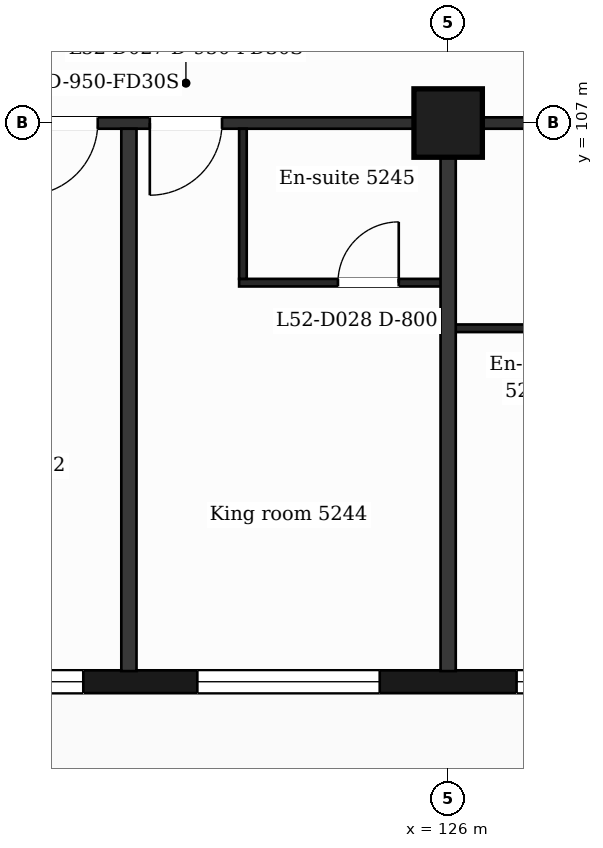
"""IFC4 building model, lengths in metres.
Left out: names, types, materials, properties, quantities, classifications, styles, units other than length and angle.
Written with IfcOpenShell. Run it as: python <this file> out.ifc"""

import sys

from ifc_helpers import new_model, si_unit, direction, frame, frame_2d, origin, origin_2d, place, context, subcontext, project, spatial, rectangle, extrude, element, fill, save


model = new_model("IFC4")
c1 = context("Model", 3, precision=1e-05, world=origin(), true_north=direction((0.0, 1.0)))
c2 = subcontext(c1, "Body", "Model", "MODEL_VIEW")
j1 = project(units=[si_unit("LENGTHUNIT", "METRE"), si_unit("PLANEANGLEUNIT", "RADIAN")], contexts=[c1])
p1 = place(None, origin())
s1 = spatial("IfcSite", under=j1, at=p1, CompositionType="ELEMENT")
p2 = place(p1, origin())
s2 = spatial("IfcBuilding", under=s1, at=p2, CompositionType="ELEMENT")
p3 = place(p2, frame((0.0, 0.0, 217.0)))
s3 = spatial("IfcBuildingStorey", under=s2, at=p3, CompositionType="ELEMENT", Elevation=217.0)
p4 = place(p3, frame((126.0, 107.0, 0.0), z_axis=(0.0, 0.0, 1.0), x_axis=(1.0, 0.0, 0.0)))
e1 = element("IfcColumn", 1, at=p4, inside=s3, PredefinedType="COLUMN", context=c2, shape_type="SweptSolid", body=[
    extrude(rectangle(XDim=0.9, YDim=0.9, at=origin_2d()), origin(), (0.0, 0.0, 1.0), 3.7),
])
p5 = place(p3, frame((89.85, 99.65, 0.0), z_axis=(0.0, 0.0, 1.0), x_axis=(1.0, 0.0, 0.0)))
e2 = element("IfcWall", 2, at=p5, inside=s3, PredefinedType="SOLIDWALL", context=c2, shape_type="SweptSolid", body=[
    extrude(rectangle(XDim=47.25, YDim=0.3, at=frame_2d((23.625, 0.0))), origin(), (0.0, 0.0, 1.0), 3.38),
])
p6 = place(p5, frame((0.725, 0.0, 0.9)))
e3 = element("IfcOpeningElement", 3, at=p6, cuts=e2, PredefinedType="OPENING", context=c2, shape_type="SweptSolid", body=[
    extrude(rectangle(XDim=1.2, YDim=2.1, at=frame_2d((0.6, 1.05))), frame((0.0, 0.16, 0.0), z_axis=(0.0, -1.0, 0.0), x_axis=(1.0, 0.0, 0.0)), (0.0, 0.0, 1.0), 0.32),
])
p7 = place(p5, frame((3.45, 0.0, 0.9)))
e4 = element("IfcOpeningElement", 4, at=p7, cuts=e2, PredefinedType="OPENING", context=c2, shape_type="SweptSolid", body=[
    extrude(rectangle(XDim=2.4, YDim=2.1, at=frame_2d((1.2, 1.05))), frame((0.0, 0.16, 0.0), z_axis=(0.0, -1.0, 0.0), x_axis=(1.0, 0.0, 0.0)), (0.0, 0.0, 1.0), 0.32),
])
p8 = place(p5, frame((7.65, 0.0, 0.9)))
e5 = element("IfcOpeningElement", 5, at=p8, cuts=e2, PredefinedType="OPENING", context=c2, shape_type="SweptSolid", body=[
    extrude(rectangle(XDim=2.4, YDim=2.1, at=frame_2d((1.2, 1.05))), frame((0.0, 0.16, 0.0), z_axis=(0.0, -1.0, 0.0), x_axis=(1.0, 0.0, 0.0)), (0.0, 0.0, 1.0), 0.32),
])
p9 = place(p5, frame((12.45, 0.0, 0.9)))
e6 = element("IfcOpeningElement", 6, at=p9, cuts=e2, PredefinedType="OPENING", context=c2, shape_type="SweptSolid", body=[
    extrude(rectangle(XDim=1.2, YDim=2.1, at=frame_2d((0.6, 1.05))), frame((0.0, 0.16, 0.0), z_axis=(0.0, -1.0, 0.0), x_axis=(1.0, 0.0, 0.0)), (0.0, 0.0, 1.0), 0.32),
])
p10 = place(p5, frame((16.65, 0.0, 0.9)))
e7 = element("IfcOpeningElement", 7, at=p10, cuts=e2, PredefinedType="OPENING", context=c2, shape_type="SweptSolid", body=[
    extrude(rectangle(XDim=1.2, YDim=2.1, at=frame_2d((0.6, 1.05))), frame((0.0, 0.16, 0.0), z_axis=(0.0, -1.0, 0.0), x_axis=(1.0, 0.0, 0.0)), (0.0, 0.0, 1.0), 0.32),
])
p11 = place(p5, frame((19.95, 0.0, 0.0)))
e8 = element("IfcOpeningElement", 8, at=p11, cuts=e2, PredefinedType="OPENING", context=c2, shape_type="SweptSolid", body=[
    extrude(rectangle(XDim=1.2, YDim=2.4, at=frame_2d((0.6, 1.2))), frame((0.0, 0.16, 0.0), z_axis=(0.0, -1.0, 0.0), x_axis=(1.0, 0.0, 0.0)), (0.0, 0.0, 1.0), 0.32),
])
p12 = place(p5, frame((21.75, 0.0, 0.9)))
e9 = element("IfcOpeningElement", 9, at=p12, cuts=e2, PredefinedType="OPENING", context=c2, shape_type="SweptSolid", body=[
    extrude(rectangle(XDim=1.2, YDim=2.1, at=frame_2d((0.6, 1.05))), frame((0.0, 0.16, 0.0), z_axis=(0.0, -1.0, 0.0), x_axis=(1.0, 0.0, 0.0)), (0.0, 0.0, 1.0), 0.32),
])
p13 = place(p5, frame((24.45, 0.0, 0.9)))
e10 = element("IfcOpeningElement", 10, at=p13, cuts=e2, PredefinedType="OPENING", context=c2, shape_type="SweptSolid", body=[
    extrude(rectangle(XDim=2.4, YDim=2.1, at=frame_2d((1.2, 1.05))), frame((0.0, 0.16, 0.0), z_axis=(0.0, -1.0, 0.0), x_axis=(1.0, 0.0, 0.0)), (0.0, 0.0, 1.0), 0.32),
])
p14 = place(p5, frame((28.35, 0.0, 0.0)))
e11 = element("IfcOpeningElement", 11, at=p14, cuts=e2, PredefinedType="OPENING", context=c2, shape_type="SweptSolid", body=[
    extrude(rectangle(XDim=1.2, YDim=2.4, at=frame_2d((0.6, 1.2))), frame((0.0, 0.16, 0.0), z_axis=(0.0, -1.0, 0.0), x_axis=(1.0, 0.0, 0.0)), (0.0, 0.0, 1.0), 0.32),
])
p15 = place(p5, frame((30.15, 0.0, 0.9)))
e12 = element("IfcOpeningElement", 12, at=p15, cuts=e2, PredefinedType="OPENING", context=c2, shape_type="SweptSolid", body=[
    extrude(rectangle(XDim=1.2, YDim=2.1, at=frame_2d((0.6, 1.05))), frame((0.0, 0.16, 0.0), z_axis=(0.0, -1.0, 0.0), x_axis=(1.0, 0.0, 0.0)), (0.0, 0.0, 1.0), 0.32),
])
p16 = place(p5, frame((32.85, 0.0, 0.9)))
e13 = element("IfcOpeningElement", 13, at=p16, cuts=e2, PredefinedType="OPENING", context=c2, shape_type="SweptSolid", body=[
    extrude(rectangle(XDim=2.4, YDim=2.1, at=frame_2d((1.2, 1.05))), frame((0.0, 0.16, 0.0), z_axis=(0.0, -1.0, 0.0), x_axis=(1.0, 0.0, 0.0)), (0.0, 0.0, 1.0), 0.32),
])
p17 = place(p5, frame((37.05, 0.0, 0.9)))
e14 = element("IfcOpeningElement", 14, at=p17, cuts=e2, PredefinedType="OPENING", context=c2, shape_type="SweptSolid", body=[
    extrude(rectangle(XDim=2.4, YDim=2.1, at=frame_2d((1.2, 1.05))), frame((0.0, 0.16, 0.0), z_axis=(0.0, -1.0, 0.0), x_axis=(1.0, 0.0, 0.0)), (0.0, 0.0, 1.0), 0.32),
])
p18 = place(p5, frame((41.85, 0.0, 0.9)))
e15 = element("IfcOpeningElement", 15, at=p18, cuts=e2, PredefinedType="OPENING", context=c2, shape_type="SweptSolid", body=[
    extrude(rectangle(XDim=1.2, YDim=2.1, at=frame_2d((0.6, 1.05))), frame((0.0, 0.16, 0.0), z_axis=(0.0, -1.0, 0.0), x_axis=(1.0, 0.0, 0.0)), (0.0, 0.0, 1.0), 0.32),
])
p19 = place(p5, frame((45.25, 0.0, 0.9)))
e16 = element("IfcOpeningElement", 16, at=p19, cuts=e2, PredefinedType="OPENING", context=c2, shape_type="SweptSolid", body=[
    extrude(rectangle(XDim=1.2, YDim=2.1, at=frame_2d((0.6, 1.05))), frame((0.0, 0.16, 0.0), z_axis=(0.0, -1.0, 0.0), x_axis=(1.0, 0.0, 0.0)), (0.0, 0.0, 1.0), 0.32),
])
p20 = place(p3, frame((126.0, 104.3, 0.0), z_axis=(0.0, 0.0, 1.0), x_axis=(1.0, 0.0, 0.0)))
e17 = element("IfcWall", 17, at=p20, inside=s3, PredefinedType="PARTITIONING", context=c2, shape_type="SweptSolid", body=[
    extrude(rectangle(XDim=2.15, YDim=0.1, at=frame_2d((1.075, 0.0))), origin(), (0.0, 0.0, 1.0), 3.38),
])
p21 = place(p3, frame((123.25, 104.9, 0.0), z_axis=(0.0, 0.0, 1.0), x_axis=(1.0, 0.0, 0.0)))
e18 = element("IfcWall", 18, at=p21, inside=s3, PredefinedType="PARTITIONING", context=c2, shape_type="SweptSolid", body=[
    extrude(rectangle(XDim=2.75, YDim=0.1, at=frame_2d((1.375, 0.0))), origin(), (0.0, 0.0, 1.0), 3.38),
])
p22 = place(p21, frame((1.3, 0.0, 0.0)))
e19 = element("IfcOpeningElement", 19, at=p22, cuts=e18, PredefinedType="OPENING", context=c2, shape_type="SweptSolid", body=[
    extrude(rectangle(XDim=0.8, YDim=2.1, at=frame_2d((0.4, 1.05))), frame((0.0, 0.06, 0.0), z_axis=(0.0, -1.0, 0.0), x_axis=(1.0, 0.0, 0.0)), (0.0, 0.0, 1.0), 0.12),
])
p23 = place(p3, frame((87.018, 107.0, 0.0), z_axis=(0.0, 0.0, 1.0), x_axis=(1.0, 0.0, 0.0)))
e20 = element("IfcWall", 20, at=p23, inside=s3, PredefinedType="PARTITIONING", context=c2, shape_type="SweptSolid", body=[
    extrude(rectangle(XDim=52.765, YDim=0.15, at=frame_2d((26.382, 0.0))), origin(), (0.0, 0.0, 1.0), 3.38),
])
p24 = place(p23, frame((1.276, 0.0, 0.0)))
e21 = element("IfcOpeningElement", 21, at=p24, cuts=e20, PredefinedType="OPENING", context=c2, shape_type="SweptSolid", body=[
    extrude(rectangle(XDim=0.95, YDim=2.1, at=frame_2d((0.475, 1.05))), frame((0.0, 0.085, 0.0), z_axis=(0.0, -1.0, 0.0), x_axis=(1.0, 0.0, 0.0)), (0.0, 0.0, 1.0), 0.17),
])
p25 = place(p23, frame((6.034, 0.0, 0.0)))
e22 = element("IfcOpeningElement", 22, at=p25, cuts=e20, PredefinedType="OPENING", context=c2, shape_type="SweptSolid", body=[
    extrude(rectangle(XDim=0.95, YDim=2.1, at=frame_2d((0.475, 1.05))), frame((0.0, 0.085, 0.0), z_axis=(0.0, -1.0, 0.0), x_axis=(1.0, 0.0, 0.0)), (0.0, 0.0, 1.0), 0.17),
])
p26 = place(p23, frame((15.445, 0.0, 0.0)))
e23 = element("IfcOpeningElement", 23, at=p26, cuts=e20, PredefinedType="OPENING", context=c2, shape_type="SweptSolid", body=[
    extrude(rectangle(XDim=0.95, YDim=2.1, at=frame_2d((0.475, 1.05))), frame((0.0, 0.085, 0.0), z_axis=(0.0, -1.0, 0.0), x_axis=(1.0, 0.0, 0.0)), (0.0, 0.0, 1.0), 0.17),
])
p27 = place(p23, frame((18.369, 0.0, 0.0)))
e24 = element("IfcOpeningElement", 24, at=p27, cuts=e20, PredefinedType="OPENING", context=c2, shape_type="SweptSolid", body=[
    extrude(rectangle(XDim=0.95, YDim=2.1, at=frame_2d((0.475, 1.05))), frame((0.0, 0.085, 0.0), z_axis=(0.0, -1.0, 0.0), x_axis=(1.0, 0.0, 0.0)), (0.0, 0.0, 1.0), 0.17),
])
p28 = place(p23, frame((24.519, 0.0, 0.0)))
e25 = element("IfcOpeningElement", 25, at=p28, cuts=e20, PredefinedType="OPENING", context=c2, shape_type="SweptSolid", body=[
    extrude(rectangle(XDim=0.95, YDim=2.1, at=frame_2d((0.475, 1.05))), frame((0.0, 0.085, 0.0), z_axis=(0.0, -1.0, 0.0), x_axis=(1.0, 0.0, 0.0)), (0.0, 0.0, 1.0), 0.17),
])
p29 = place(p23, frame((26.632, 0.0, 0.0)))
e26 = element("IfcOpeningElement", 26, at=p29, cuts=e20, PredefinedType="OPENING", context=c2, shape_type="SweptSolid", body=[
    extrude(rectangle(XDim=1.0, YDim=2.1, at=frame_2d((0.5, 1.05))), frame((0.0, 0.085, 0.0), z_axis=(0.0, -1.0, 0.0), x_axis=(1.0, 0.0, 0.0)), (0.0, 0.0, 1.0), 0.17),
])
p30 = place(p23, frame((33.422, 0.0, 0.0)))
e27 = element("IfcOpeningElement", 27, at=p30, cuts=e20, PredefinedType="OPENING", context=c2, shape_type="SweptSolid", body=[
    extrude(rectangle(XDim=0.95, YDim=2.1, at=frame_2d((0.475, 1.05))), frame((0.0, 0.085, 0.0), z_axis=(0.0, -1.0, 0.0), x_axis=(1.0, 0.0, 0.0)), (0.0, 0.0, 1.0), 0.17),
])
p31 = place(p23, frame((35.057, 0.0, 0.0)))
e28 = element("IfcOpeningElement", 28, at=p31, cuts=e20, PredefinedType="OPENING", context=c2, shape_type="SweptSolid", body=[
    extrude(rectangle(XDim=0.95, YDim=2.1, at=frame_2d((0.475, 1.05))), frame((0.0, 0.085, 0.0), z_axis=(0.0, -1.0, 0.0), x_axis=(1.0, 0.0, 0.0)), (0.0, 0.0, 1.0), 0.17),
])
p32 = place(p23, frame((44.532, 0.0, 0.0)))
e29 = element("IfcOpeningElement", 29, at=p32, cuts=e20, PredefinedType="OPENING", context=c2, shape_type="SweptSolid", body=[
    extrude(rectangle(XDim=1.0, YDim=2.1, at=frame_2d((0.5, 1.05))), frame((0.0, 0.085, 0.0), z_axis=(0.0, -1.0, 0.0), x_axis=(1.0, 0.0, 0.0)), (0.0, 0.0, 1.0), 0.17),
])
p33 = place(p23, frame((48.249, 0.0, 0.0)))
e30 = element("IfcOpeningElement", 30, at=p33, cuts=e20, PredefinedType="OPENING", context=c2, shape_type="SweptSolid", body=[
    extrude(rectangle(XDim=0.95, YDim=2.1, at=frame_2d((0.475, 1.05))), frame((0.0, 0.085, 0.0), z_axis=(0.0, -1.0, 0.0), x_axis=(1.0, 0.0, 0.0)), (0.0, 0.0, 1.0), 0.17),
])
p34 = place(p3, frame((121.8, 99.79, 0.0), z_axis=(0.0, 0.0, 1.0), x_axis=(0.0, 1.0, 0.0)))
e31 = element("IfcWall", 31, at=p34, inside=s3, PredefinedType="PARTITIONING", context=c2, shape_type="SweptSolid", body=[
    extrude(rectangle(XDim=7.135, YDim=0.2, at=frame_2d((3.567, 0.0))), origin(), (0.0, 0.0, 1.0), 3.38),
])
p35 = place(p3, frame((123.3, 104.95, 0.0), z_axis=(0.0, 0.0, 1.0), x_axis=(0.0, 1.0, 0.0)))
e32 = element("IfcWall", 32, at=p35, inside=s3, PredefinedType="PARTITIONING", context=c2, shape_type="SweptSolid", body=[
    extrude(rectangle(XDim=1.975, YDim=0.1, at=frame_2d((0.988, 0.0))), origin(), (0.0, 0.0, 1.0), 3.38),
])
p36 = place(p3, frame((126.0, 99.79, 0.0), z_axis=(0.0, 0.0, 1.0), x_axis=(0.0, 1.0, 0.0)))
e33 = element("IfcWall", 33, at=p36, inside=s3, PredefinedType="PARTITIONING", context=c2, shape_type="SweptSolid", body=[
    extrude(rectangle(XDim=7.135, YDim=0.2, at=frame_2d((3.567, 0.0))), origin(), (0.0, 0.0, 1.0), 3.38),
])
p37 = place(p15, origin())
e34 = element("IfcWindow", 34, at=p37, inside=s3, PartitioningType="SINGLE_PANEL", PredefinedType="WINDOW", context=c2, shape_type="SweptSolid", body=[
    extrude(rectangle(XDim=1.2, YDim=2.1, at=frame_2d((0.6, 1.05))), frame((0.0, 0.03, 0.0), z_axis=(0.0, -1.0, 0.0), x_axis=(1.0, 0.0, 0.0)), (0.0, 0.0, 1.0), 0.06),
])
fill(e12, e34)
p38 = place(p16, origin())
e35 = element("IfcWindow", 35, at=p38, inside=s3, PartitioningType="SINGLE_PANEL", PredefinedType="WINDOW", context=c2, shape_type="SweptSolid", body=[
    extrude(rectangle(XDim=2.4, YDim=2.1, at=frame_2d((1.2, 1.05))), frame((0.0, 0.03, 0.0), z_axis=(0.0, -1.0, 0.0), x_axis=(1.0, 0.0, 0.0)), (0.0, 0.0, 1.0), 0.06),
])
fill(e13, e35)
p39 = place(p17, origin())
e36 = element("IfcWindow", 36, at=p39, inside=s3, PartitioningType="SINGLE_PANEL", PredefinedType="WINDOW", context=c2, shape_type="SweptSolid", body=[
    extrude(rectangle(XDim=2.4, YDim=2.1, at=frame_2d((1.2, 1.05))), frame((0.0, 0.03, 0.0), z_axis=(0.0, -1.0, 0.0), x_axis=(1.0, 0.0, 0.0)), (0.0, 0.0, 1.0), 0.06),
])
fill(e14, e36)
p40 = place(p30, origin())
e37 = element("IfcDoor", 37, at=p40, inside=s3, OperationType="SINGLE_SWING_LEFT", PredefinedType="DOOR", context=c2, shape_type="SweptSolid", body=[
    extrude(rectangle(XDim=0.95, YDim=2.1, at=frame_2d((0.475, 1.05))), frame((0.0, 0.025, 0.0), z_axis=(0.0, -1.0, 0.0), x_axis=(1.0, 0.0, 0.0)), (0.0, 0.0, 1.0), 0.05),
])
fill(e27, e37)
p41 = place(p31, origin())
e38 = element("IfcDoor", 38, at=p41, inside=s3, OperationType="SINGLE_SWING_LEFT", PredefinedType="DOOR", context=c2, shape_type="SweptSolid", body=[
    extrude(rectangle(XDim=0.95, YDim=2.1, at=frame_2d((0.475, 1.05))), frame((0.0, 0.025, 0.0), z_axis=(0.0, -1.0, 0.0), x_axis=(1.0, 0.0, 0.0)), (0.0, 0.0, 1.0), 0.05),
])
fill(e28, e38)
p42 = place(p22, origin())
e39 = element("IfcDoor", 39, at=p42, inside=s3, OperationType="SINGLE_SWING_RIGHT", PredefinedType="DOOR", context=c2, shape_type="SweptSolid", body=[
    extrude(rectangle(XDim=0.8, YDim=2.1, at=frame_2d((0.4, 1.05))), frame((0.0, 0.025, 0.0), z_axis=(0.0, -1.0, 0.0), x_axis=(1.0, 0.0, 0.0)), (0.0, 0.0, 1.0), 0.05),
])
fill(e19, e39)
save(model, sys.argv[1])
